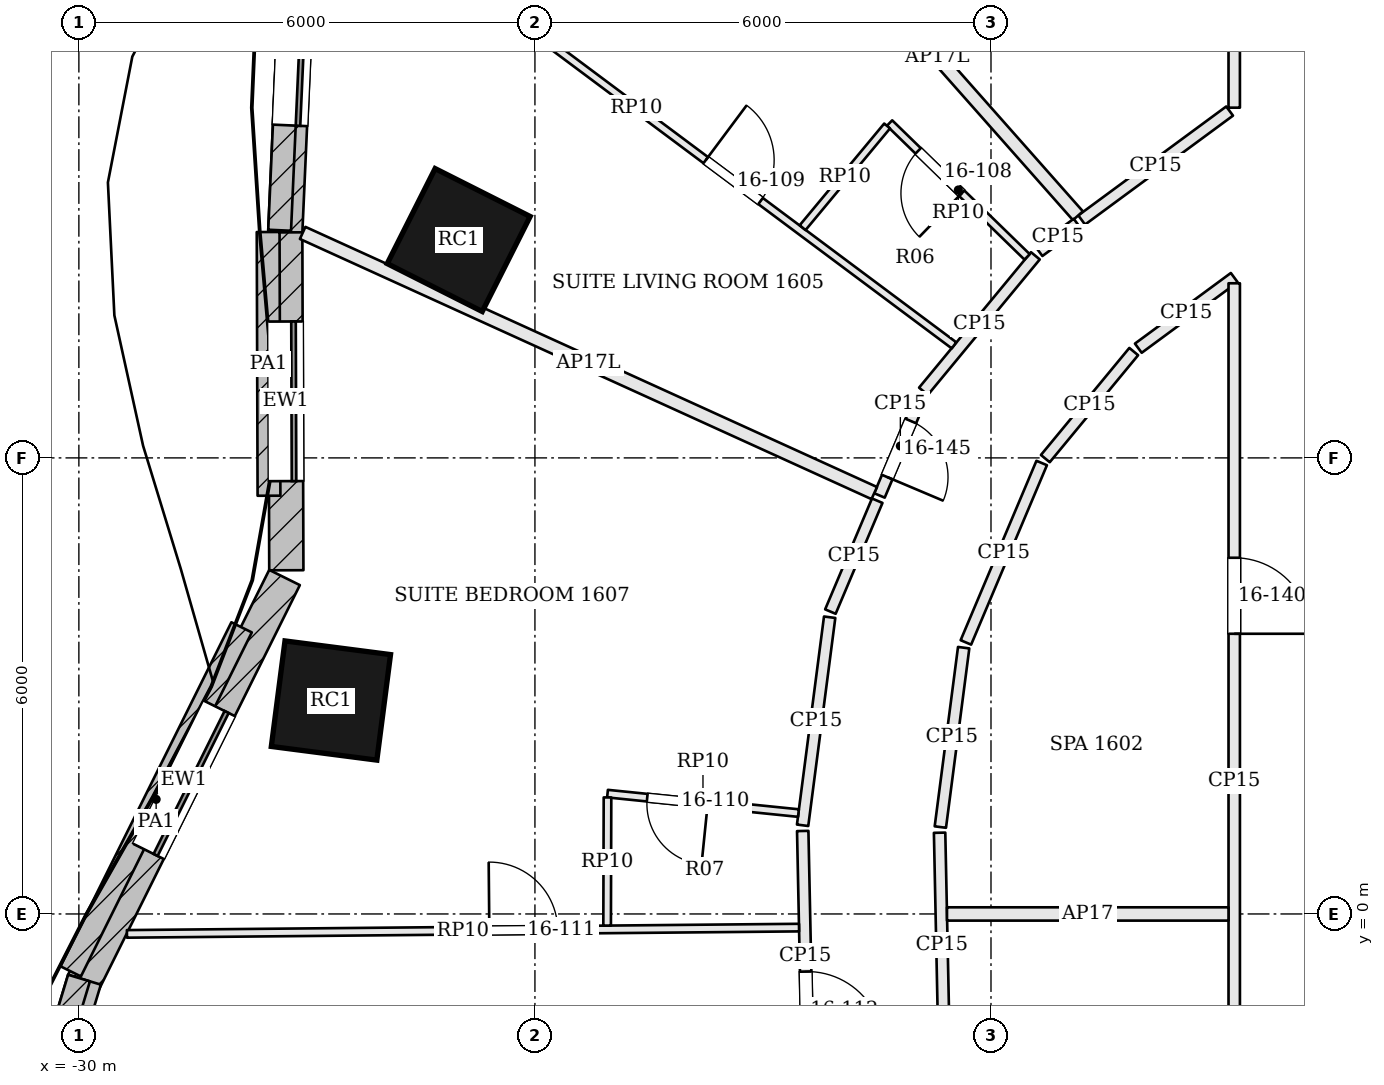
"""IFC4 building model, lengths in metres.
Left out: names, types, materials, properties, quantities, classifications, styles, units other than length and angle.
Written with IfcOpenShell. Run it as: python <this file> out.ifc"""

import sys

from ifc_helpers import new_model, si_unit, direction, frame, frame_2d, origin, origin_2d, place, context, subcontext, project, spatial, rectangle, extrude, element, fill, save


model = new_model("IFC4")
c1 = context("Model", 3, precision=1e-05, world=origin(), true_north=direction((0.0, 1.0)))
c2 = subcontext(c1, "Body", "Model", "MODEL_VIEW")
j1 = project(units=[si_unit("LENGTHUNIT", "METRE"), si_unit("PLANEANGLEUNIT", "RADIAN")], contexts=[c1])
p1 = place(None, origin())
s1 = spatial("IfcSite", under=j1, at=p1, CompositionType="ELEMENT")
p2 = place(p1, origin())
s2 = spatial("IfcBuilding", under=s1, at=p2, CompositionType="ELEMENT")
p3 = place(p2, frame((0.0, 0.0, 73.5)))
s3 = spatial("IfcBuildingStorey", under=s2, at=p3, CompositionType="ELEMENT", Elevation=73.5)
for number, where, z_axis, x_axis in (
    (1, (-25.003, 8.866, 0.0), (0.0, 0.0, 1.0), (-0.45, -0.893, 0.0)),
    (2, (-26.684, 2.808, 0.0), (0.0, 0.0, 1.0), (-0.128, -0.992, 0.0)),
):
    element("IfcColumn", number, at=place(p3, frame(where, z_axis=z_axis, x_axis=x_axis)), inside=s3, PredefinedType="COLUMN", context=c2, shape_type="SweptSolid", body=[
        extrude(rectangle(XDim=1.4, YDim=1.4, at=origin_2d()), origin(), (0.0, 0.0, 1.0), 2.8),
    ])
p4 = place(p3, frame((-27.065, 13.89, 0.0), z_axis=(0.0, 0.0, 1.0), x_axis=(-0.044544250924, -0.99900741224, 0.0)))
e3 = element("IfcWall", 3, at=p4, inside=s3, PredefinedType="SOLIDWALL", context=c2, shape_type="SweptSolid", body=[
    extrude(rectangle(XDim=4.938, YDim=0.45, at=frame_2d((2.469, 0.0))), origin(), (0.0, 0.0, 1.0), 3.3),
])
p5 = place(p4, frame((1.419, 0.0, 0.9)))
e4 = element("IfcOpeningElement", 4, at=p5, cuts=e3, PredefinedType="OPENING", context=c2, shape_type="SweptSolid", body=[
    extrude(rectangle(XDim=2.1, YDim=1.8, at=frame_2d((1.05, 0.9))), frame((0.0, 0.235, 0.0), z_axis=(0.0, -1.0, 0.0), x_axis=(1.0, 0.0, 0.0)), (0.0, 0.0, 1.0), 0.47),
])
p6 = place(p3, frame((-27.285, 8.967, 0.0), z_axis=(0.0, 0.0, 1.0), x_axis=(0.003185571797, -0.999994926053, 0.0)))
e5 = element("IfcWall", 5, at=p6, inside=s3, PredefinedType="SOLIDWALL", context=c2, shape_type="SweptSolid", body=[
    extrude(rectangle(XDim=4.445, YDim=0.45, at=frame_2d((2.223, 0.0))), origin(), (0.0, 0.0, 1.0), 3.3),
])
p7 = place(p6, frame((1.173, 0.0, 0.9)))
e6 = element("IfcOpeningElement", 6, at=p7, cuts=e5, PredefinedType="OPENING", context=c2, shape_type="SweptSolid", body=[
    extrude(rectangle(XDim=2.1, YDim=1.8, at=frame_2d((1.05, 0.9))), frame((0.0, 0.235, 0.0), z_axis=(0.0, -1.0, 0.0), x_axis=(1.0, 0.0, 0.0)), (0.0, 0.0, 1.0), 0.47),
])
p8 = place(p3, frame((-27.294, 4.427, 0.0), z_axis=(0.0, 0.0, 1.0), x_axis=(-0.444913249375, -0.895573671191, 0.0)))
e7 = element("IfcWall", 7, at=p8, inside=s3, PredefinedType="SOLIDWALL", context=c2, shape_type="SweptSolid", body=[
    extrude(rectangle(XDim=5.947, YDim=0.45, at=frame_2d((2.974, 0.0))), origin(), (0.0, 0.0, 1.0), 3.3),
])
p9 = place(p8, frame((1.924, 0.0, 0.9)))
e8 = element("IfcOpeningElement", 8, at=p9, cuts=e7, PredefinedType="OPENING", context=c2, shape_type="SweptSolid", body=[
    extrude(rectangle(XDim=2.1, YDim=1.8, at=frame_2d((1.05, 0.9))), frame((0.0, 0.235, 0.0), z_axis=(0.0, -1.0, 0.0), x_axis=(1.0, 0.0, 0.0)), (0.0, 0.0, 1.0), 0.47),
])
p10 = place(p3, frame((-29.927, -0.865, 0.0), z_axis=(0.0, 0.0, 1.0), x_axis=(-0.289432445378, -0.957198443147, 0.0)))
e9 = element("IfcWall", 9, at=p10, inside=s3, PredefinedType="SOLIDWALL", context=c2, shape_type="SweptSolid", body=[
    extrude(rectangle(XDim=4.361, YDim=0.45, at=frame_2d((2.181, 0.0))), origin(), (0.0, 0.0, 1.0), 3.3),
])
p11 = place(p10, frame((1.131, 0.0, 0.9)))
e10 = element("IfcOpeningElement", 10, at=p11, cuts=e9, PredefinedType="OPENING", context=c2, shape_type="SweptSolid", body=[
    extrude(rectangle(XDim=2.1, YDim=1.8, at=frame_2d((1.05, 0.9))), frame((0.0, 0.235, 0.0), z_axis=(0.0, -1.0, 0.0), x_axis=(1.0, 0.0, 0.0)), (0.0, 0.0, 1.0), 0.47),
])
p12 = place(p3, frame((-27.146, 13.757, 3.6), z_axis=(0.0, 0.0, 1.0), x_axis=(-0.044503972994, -0.999009207359, 0.0)))
e11 = element("IfcWall", 11, at=p12, inside=s3, PredefinedType="PARAPET", context=c2, shape_type="SweptSolid", body=[
    extrude(rectangle(XDim=4.767, YDim=0.3, at=frame_2d((2.384, 0.0))), origin(), (0.0, 0.0, 1.0), 1.1),
])
p13 = place(p3, frame((-27.51, 8.972, 3.6), z_axis=(0.0, 0.0, 1.0), x_axis=(0.003236912182, -0.999994761186, 0.0)))
e12 = element("IfcWall", 12, at=p13, inside=s3, PredefinedType="PARAPET", context=c2, shape_type="SweptSolid", body=[
    extrude(rectangle(XDim=3.469, YDim=0.3, at=frame_2d((1.735, 0.0))), origin(), (0.0, 0.0, 1.0), 1.1),
])
p14 = place(p3, frame((-27.859, 3.771, 3.6), z_axis=(0.0, 0.0, 1.0), x_axis=(-0.444912677503, -0.895573955292, 0.0)))
e13 = element("IfcWall", 13, at=p14, inside=s3, PredefinedType="PARAPET", context=c2, shape_type="SweptSolid", body=[
    extrude(rectangle(XDim=5.054, YDim=0.3, at=frame_2d((2.527, 0.0))), origin(), (0.0, 0.0, 1.0), 1.1),
])
p15 = place(p3, frame((-29.998, -0.843, 3.6), z_axis=(0.0, 0.0, 1.0), x_axis=(-0.289403108737, -0.95720731331, 0.0)))
e14 = element("IfcWall", 14, at=p15, inside=s3, PredefinedType="PARAPET", context=c2, shape_type="SweptSolid", body=[
    extrude(rectangle(XDim=4.205, YDim=0.3, at=frame_2d((2.103, 0.0))), origin(), (0.0, 0.0, 1.0), 1.1),
])
p16 = place(p3, frame((-14.8, 13.725, 0.0), z_axis=(0.0, 0.0, 1.0), x_axis=(0.0, -1.0, 0.0)))
e15 = element("IfcWall", 15, at=p16, inside=s3, PredefinedType="PARTITIONING", context=c2, shape_type="SweptSolid", body=[
    extrude(rectangle(XDim=3.118, YDim=0.15, at=frame_2d((1.559, 0.0))), origin(), (0.0, 0.0, 1.0), 2.684),
])
p17 = place(p3, frame((-14.861, 10.563, 0.0), z_axis=(0.0, 0.0, 1.0), x_axis=(-0.805253823387, -0.592930248781, 0.0)))
e16 = element("IfcWall", 16, at=p17, inside=s3, PredefinedType="PARTITIONING", context=c2, shape_type="SweptSolid", body=[
    extrude(rectangle(XDim=2.417, YDim=0.15, at=frame_2d((1.208, 0.0))), origin(), (0.0, 0.0, 1.0), 2.684),
])
p18 = place(p3, frame((-20.558, 13.368, 0.0), z_axis=(0.0, 0.0, 1.0), x_axis=(0.662734219401, -0.748854695141, 0.0)))
e17 = element("IfcWall", 17, at=p18, inside=s3, PredefinedType="PARTITIONING", context=c2, shape_type="SweptSolid", body=[
    extrude(rectangle(XDim=5.585, YDim=0.175, at=frame_2d((2.792, 0.0))), origin(), (0.0, 0.0, 1.0), 2.28),
])
p19 = place(p3, frame((-16.867, 9.085, 0.0), z_axis=(0.0, 0.0, 1.0), x_axis=(-0.805381102541, -0.592757353113, 0.0)))
e18 = element("IfcWall", 18, at=p19, inside=s3, PredefinedType="PARTITIONING", context=c2, shape_type="SweptSolid", body=[
    extrude(rectangle(XDim=0.622, YDim=0.15, at=frame_2d((0.311, 0.0))), origin(), (0.0, 0.0, 1.0), 2.684),
])
p20 = place(p3, frame((-17.416, 8.659, 0.0), z_axis=(0.0, 0.0, 1.0), x_axis=(-0.636865073139, -0.770975277564, 0.0)))
e19 = element("IfcWall", 19, at=p20, inside=s3, PredefinedType="PARTITIONING", context=c2, shape_type="SweptSolid", body=[
    extrude(rectangle(XDim=2.312, YDim=0.15, at=frame_2d((1.156, 0.0))), origin(), (0.0, 0.0, 1.0), 2.684),
])
p21 = place(p3, frame((-18.918, 6.807, 0.0), z_axis=(0.0, 0.0, 1.0), x_axis=(-0.389115481404, -0.921188982854, 0.0)))
e20 = element("IfcWall", 20, at=p21, inside=s3, PredefinedType="PARTITIONING", context=c2, shape_type="SweptSolid", body=[
    extrude(rectangle(XDim=1.412, YDim=0.15, at=frame_2d((0.706, 0.0))), origin(), (0.0, 0.0, 1.0), 2.684),
])
p22 = place(p21, frame((0.35, 0.0, 0.0)))
e21 = element("IfcOpeningElement", 21, at=p22, cuts=e20, PredefinedType="OPENING", context=c2, shape_type="SweptSolid", body=[
    extrude(rectangle(XDim=0.8, YDim=2.1, at=frame_2d((0.4, 1.05))), frame((0.0, 0.085, 0.0), z_axis=(0.0, -1.0, 0.0), x_axis=(1.0, 0.0, 0.0)), (0.0, 0.0, 1.0), 0.17),
])
p23 = place(p3, frame((-27.056, 8.96, 0.0), z_axis=(0.0, 0.0, 1.0), x_axis=(0.910158921773, -0.414259263164, 0.0)))
e22 = element("IfcWall", 22, at=p23, inside=s3, PredefinedType="PARTITIONING", context=c2, shape_type="SweptSolid", body=[
    extrude(rectangle(XDim=8.263, YDim=0.175, at=frame_2d((4.131, 0.0))), origin(), (0.0, 0.0, 1.0), 2.28),
])
p24 = place(p3, frame((-19.497, 5.437, 0.0), z_axis=(0.0, 0.0, 1.0), x_axis=(-0.389131954688, -0.921182024271, 0.0)))
e23 = element("IfcWall", 23, at=p24, inside=s3, PredefinedType="PARTITIONING", context=c2, shape_type="SweptSolid", body=[
    extrude(rectangle(XDim=1.583, YDim=0.15, at=frame_2d((0.792, 0.0))), origin(), (0.0, 0.0, 1.0), 2.684),
])
p25 = place(p3, frame((-20.123, 3.904, 0.0), z_axis=(0.0, 0.0, 1.0), x_axis=(-0.128964810526, -0.991649170648, 0.0)))
e24 = element("IfcWall", 24, at=p25, inside=s3, PredefinedType="PARTITIONING", context=c2, shape_type="SweptSolid", body=[
    extrude(rectangle(XDim=2.76, YDim=0.15, at=frame_2d((1.38, 0.0))), origin(), (0.0, 0.0, 1.0), 2.684),
])
p26 = place(p3, frame((-20.477, 1.092, 0.0), z_axis=(0.0, 0.0, 1.0), x_axis=(0.020774736247, -0.999784181878, 0.0)))
e25 = element("IfcWall", 25, at=p26, inside=s3, PredefinedType="PARTITIONING", context=c2, shape_type="SweptSolid", body=[
    extrude(rectangle(XDim=3.291, YDim=0.15, at=frame_2d((1.645, 0.0))), origin(), (0.0, 0.0, 1.0), 2.684),
])
p27 = place(p26, frame((1.85, 0.0, 0.0)))
e26 = element("IfcOpeningElement", 26, at=p27, cuts=e25, PredefinedType="OPENING", context=c2, shape_type="SweptSolid", body=[
    extrude(rectangle(XDim=1.0, YDim=2.1, at=frame_2d((0.5, 1.05))), frame((0.0, 0.085, 0.0), z_axis=(0.0, -1.0, 0.0), x_axis=(1.0, 0.0, 0.0)), (0.0, 0.0, 1.0), 0.17),
])
p28 = place(p3, frame((-18.615, -1.89, 0.0), z_axis=(0.0, 0.0, 1.0), x_axis=(-0.020789300895, 0.99978387913, 0.0)))
e27 = element("IfcWall", 27, at=p28, inside=s3, PredefinedType="PARTITIONING", context=c2, shape_type="SweptSolid", body=[
    extrude(rectangle(XDim=2.959, YDim=0.15, at=frame_2d((1.48, 0.0))), origin(), (0.0, 0.0, 1.0), 2.684),
])
p29 = place(p3, frame((-18.667, 1.143, 0.0), z_axis=(0.0, 0.0, 1.0), x_axis=(0.128944484332, 0.991651813874, 0.0)))
e28 = element("IfcWall", 28, at=p29, inside=s3, PredefinedType="PARTITIONING", context=c2, shape_type="SweptSolid", body=[
    extrude(rectangle(XDim=2.38, YDim=0.15, at=frame_2d((1.19, 0.0))), origin(), (0.0, 0.0, 1.0), 2.684),
])
p30 = place(p3, frame((-18.33, 3.573, 0.0), z_axis=(0.0, 0.0, 1.0), x_axis=(0.389176861346, 0.921163053207, 0.0)))
e29 = element("IfcWall", 29, at=p30, inside=s3, PredefinedType="PARTITIONING", context=c2, shape_type="SweptSolid", body=[
    extrude(rectangle(XDim=2.563, YDim=0.15, at=frame_2d((1.281, 0.0))), origin(), (0.0, 0.0, 1.0), 2.684),
])
p31 = place(p3, frame((-17.285, 5.991, 0.0), z_axis=(0.0, 0.0, 1.0), x_axis=(0.636877992195, 0.770964605581, 0.0)))
e30 = element("IfcWall", 30, at=p31, inside=s3, PredefinedType="PARTITIONING", context=c2, shape_type="SweptSolid", body=[
    extrude(rectangle(XDim=1.826, YDim=0.15, at=frame_2d((0.913, 0.0))), origin(), (0.0, 0.0, 1.0), 2.684),
])
p32 = place(p3, frame((-16.062, 7.443, 0.0), z_axis=(0.0, 0.0, 1.0), x_axis=(0.805204624788, 0.5929970592, 0.0)))
e31 = element("IfcWall", 31, at=p32, inside=s3, PredefinedType="PARTITIONING", context=c2, shape_type="SweptSolid", body=[
    extrude(rectangle(XDim=1.567, YDim=0.15, at=frame_2d((0.783, 0.0))), origin(), (0.0, 0.0, 1.0), 2.684),
])
p33 = place(p3, frame((-14.8, 8.297, 0.0), z_axis=(0.0, 0.0, 1.0), x_axis=(0.0, -1.0, 0.0)))
e32 = element("IfcWall", 32, at=p33, inside=s3, PredefinedType="PARTITIONING", context=c2, shape_type="SweptSolid", body=[
    extrude(rectangle(XDim=13.097, YDim=0.15, at=frame_2d((6.549, 0.0))), origin(), (0.0, 0.0, 1.0), 2.684),
])
p34 = place(p33, frame((3.611, 0.0, 0.0)))
e33 = element("IfcOpeningElement", 33, at=p34, cuts=e32, PredefinedType="OPENING", context=c2, shape_type="SweptSolid", body=[
    extrude(rectangle(XDim=1.0, YDim=2.1, at=frame_2d((0.5, 1.05))), frame((0.0, 0.085, 0.0), z_axis=(0.0, -1.0, 0.0), x_axis=(1.0, 0.0, 0.0)), (0.0, 0.0, 1.0), 0.17),
])
p35 = place(p3, frame((-26.844, 13.716, 0.0), z_axis=(0.0, 0.0, 1.0), x_axis=(0.801523054034, -0.597963873367, 0.0)))
e34 = element("IfcWall", 34, at=p35, inside=s3, PredefinedType="PARTITIONING", context=c2, shape_type="SweptSolid", body=[
    extrude(rectangle(XDim=10.427, YDim=0.1, at=frame_2d((5.214, 0.0))), origin(), (0.0, 0.0, 1.0), 2.784),
])
p36 = place(p35, frame((6.352, 0.0, 0.0)))
e35 = element("IfcOpeningElement", 35, at=p36, cuts=e34, PredefinedType="OPENING", context=c2, shape_type="SweptSolid", body=[
    extrude(rectangle(XDim=0.9, YDim=2.4, at=frame_2d((0.45, 1.2))), frame((0.0, 0.06, 0.0), z_axis=(0.0, -1.0, 0.0), x_axis=(1.0, 0.0, 0.0)), (0.0, 0.0, 1.0), 0.12),
])
p37 = place(p3, frame((-17.525, 8.644, 0.0), z_axis=(0.0, 0.0, 1.0), x_axis=(-0.716661927844, 0.697420734692, 0.0)))
e36 = element("IfcWall", 36, at=p37, inside=s3, PredefinedType="PARTITIONING", context=c2, shape_type="SweptSolid", body=[
    extrude(rectangle(XDim=2.525, YDim=0.1, at=frame_2d((1.262, 0.0))), origin(), (0.0, 0.0, 1.0), 2.784),
])
p38 = place(p37, frame((1.2, 0.0, 0.0)))
e37 = element("IfcOpeningElement", 37, at=p38, cuts=e36, PredefinedType="OPENING", context=c2, shape_type="SweptSolid", body=[
    extrude(rectangle(XDim=0.8, YDim=2.1, at=frame_2d((0.4, 1.05))), frame((0.0, 0.06, 0.0), z_axis=(0.0, -1.0, 0.0), x_axis=(1.0, 0.0, 0.0)), (0.0, 0.0, 1.0), 0.12),
])
p39 = place(p3, frame((-19.366, 10.367, 0.0), z_axis=(0.0, 0.0, 1.0), x_axis=(-0.63913466048, -0.76909484836, 0.0)))
e38 = element("IfcWall", 38, at=p39, inside=s3, PredefinedType="PARTITIONING", context=c2, shape_type="SweptSolid", body=[
    extrude(rectangle(XDim=1.74, YDim=0.1, at=frame_2d((0.87, 0.0))), origin(), (0.0, 0.0, 1.0), 2.784),
])
p40 = place(p3, frame((-29.368, -0.262, 0.0), z_axis=(0.0, 0.0, 1.0), x_axis=(0.999956200621, 0.009359318369, 0.0)))
e39 = element("IfcWall", 39, at=p40, inside=s3, PredefinedType="PARTITIONING", context=c2, shape_type="SweptSolid", body=[
    extrude(rectangle(XDim=8.843, YDim=0.1, at=frame_2d((4.421, 0.0))), origin(), (0.0, 0.0, 1.0), 2.784),
])
p41 = place(p40, frame((4.768, 0.0, 0.0)))
e40 = element("IfcOpeningElement", 40, at=p41, cuts=e39, PredefinedType="OPENING", context=c2, shape_type="SweptSolid", body=[
    extrude(rectangle(XDim=0.9, YDim=2.4, at=frame_2d((0.45, 1.2))), frame((0.0, 0.06, 0.0), z_axis=(0.0, -1.0, 0.0), x_axis=(1.0, 0.0, 0.0)), (0.0, 0.0, 1.0), 0.12),
])
p42 = place(p3, frame((-20.533, 1.327, 0.0), z_axis=(0.0, 0.0, 1.0), x_axis=(-0.994862401986, 0.101236362609, 0.0)))
e41 = element("IfcWall", 41, at=p42, inside=s3, PredefinedType="PARTITIONING", context=c2, shape_type="SweptSolid", body=[
    extrude(rectangle(XDim=2.525, YDim=0.1, at=frame_2d((1.262, 0.0))), origin(), (0.0, 0.0, 1.0), 2.784),
])
p43 = place(p42, frame((1.2, 0.0, 0.0)))
e42 = element("IfcOpeningElement", 42, at=p43, cuts=e41, PredefinedType="OPENING", context=c2, shape_type="SweptSolid", body=[
    extrude(rectangle(XDim=0.8, YDim=2.1, at=frame_2d((0.4, 1.05))), frame((0.0, 0.06, 0.0), z_axis=(0.0, -1.0, 0.0), x_axis=(1.0, 0.0, 0.0)), (0.0, 0.0, 1.0), 0.12),
])
p44 = place(p3, frame((-23.045, 1.533, 0.0), z_axis=(0.0, 0.0, 1.0), x_axis=(-0.002895601007, -0.999995807739, 0.0)))
e43 = element("IfcWall", 43, at=p44, inside=s3, PredefinedType="PARTITIONING", context=c2, shape_type="SweptSolid", body=[
    extrude(rectangle(XDim=1.686, YDim=0.1, at=frame_2d((0.843, 0.0))), origin(), (0.0, 0.0, 1.0), 2.784),
])
p45 = place(p3, frame((-18.579, 0.0, 0.0), z_axis=(0.0, 0.0, 1.0), x_axis=(1.0, 0.0, 0.0)))
e44 = element("IfcWall", 44, at=p45, inside=s3, PredefinedType="PARTITIONING", context=c2, shape_type="SweptSolid", body=[
    extrude(rectangle(XDim=3.704, YDim=0.175, at=frame_2d((1.852, 0.0))), origin(), (0.0, 0.0, 1.0), 2.798),
])
p46 = place(p5, origin())
e45 = element("IfcWindow", 45, at=p46, inside=s3, PartitioningType="SINGLE_PANEL", PredefinedType="WINDOW", context=c2, shape_type="SweptSolid", body=[
    extrude(rectangle(XDim=2.1, YDim=1.8, at=frame_2d((1.05, 0.9))), frame((0.0, 0.135, 0.0), z_axis=(0.0, -1.0, 0.0), x_axis=(1.0, 0.0, 0.0)), (0.0, 0.0, 1.0), 0.06),
])
fill(e4, e45)
p47 = place(p7, origin())
e46 = element("IfcWindow", 46, at=p47, inside=s3, PartitioningType="SINGLE_PANEL", PredefinedType="WINDOW", context=c2, shape_type="SweptSolid", body=[
    extrude(rectangle(XDim=2.1, YDim=1.8, at=frame_2d((1.05, 0.9))), frame((0.0, 0.135, 0.0), z_axis=(0.0, -1.0, 0.0), x_axis=(1.0, 0.0, 0.0)), (0.0, 0.0, 1.0), 0.06),
])
fill(e6, e46)
p48 = place(p9, origin())
e47 = element("IfcWindow", 47, at=p48, inside=s3, PartitioningType="SINGLE_PANEL", PredefinedType="WINDOW", context=c2, shape_type="SweptSolid", body=[
    extrude(rectangle(XDim=2.1, YDim=1.8, at=frame_2d((1.05, 0.9))), frame((0.0, 0.135, 0.0), z_axis=(0.0, -1.0, 0.0), x_axis=(1.0, 0.0, 0.0)), (0.0, 0.0, 1.0), 0.06),
])
fill(e8, e47)
p49 = place(p38, origin())
e48 = element("IfcDoor", 48, at=p49, inside=s3, OperationType="SINGLE_SWING_LEFT", PredefinedType="DOOR", context=c2, shape_type="SweptSolid", body=[
    extrude(rectangle(XDim=0.8, YDim=2.1, at=frame_2d((0.4, 1.05))), frame((0.0, 0.025, 0.0), z_axis=(0.0, -1.0, 0.0), x_axis=(1.0, 0.0, 0.0)), (0.0, 0.0, 1.0), 0.05),
])
fill(e37, e48)
p50 = place(p36, origin())
e49 = element("IfcDoor", 49, at=p50, inside=s3, OperationType="SINGLE_SWING_LEFT", PredefinedType="DOOR", context=c2, shape_type="SweptSolid", body=[
    extrude(rectangle(XDim=0.9, YDim=2.4, at=frame_2d((0.45, 1.2))), frame((0.0, 0.025, 0.0), z_axis=(0.0, -1.0, 0.0), x_axis=(1.0, 0.0, 0.0)), (0.0, 0.0, 1.0), 0.05),
])
fill(e35, e49)
p51 = place(p43, origin())
e50 = element("IfcDoor", 50, at=p51, inside=s3, OperationType="SINGLE_SWING_LEFT", PredefinedType="DOOR", context=c2, shape_type="SweptSolid", body=[
    extrude(rectangle(XDim=0.8, YDim=2.1, at=frame_2d((0.4, 1.05))), frame((0.0, 0.025, 0.0), z_axis=(0.0, -1.0, 0.0), x_axis=(1.0, 0.0, 0.0)), (0.0, 0.0, 1.0), 0.05),
])
fill(e42, e50)
p52 = place(p41, origin())
e51 = element("IfcDoor", 51, at=p52, inside=s3, OperationType="SINGLE_SWING_LEFT", PredefinedType="DOOR", context=c2, shape_type="SweptSolid", body=[
    extrude(rectangle(XDim=0.9, YDim=2.4, at=frame_2d((0.45, 1.2))), frame((0.0, 0.025, 0.0), z_axis=(0.0, -1.0, 0.0), x_axis=(1.0, 0.0, 0.0)), (0.0, 0.0, 1.0), 0.05),
])
fill(e40, e51)
p53 = place(p27, origin())
e52 = element("IfcDoor", 52, at=p53, inside=s3, OperationType="SINGLE_SWING_RIGHT", PredefinedType="DOOR", context=c2, shape_type="SweptSolid", body=[
    extrude(rectangle(XDim=1.0, YDim=2.1, at=frame_2d((0.5, 1.05))), frame((0.0, 0.025, 0.0), z_axis=(0.0, -1.0, 0.0), x_axis=(1.0, 0.0, 0.0)), (0.0, 0.0, 1.0), 0.05),
])
fill(e26, e52)
p54 = place(p34, origin())
e53 = element("IfcDoor", 53, at=p54, inside=s3, OperationType="SINGLE_SWING_RIGHT", PredefinedType="DOOR", context=c2, shape_type="SweptSolid", body=[
    extrude(rectangle(XDim=1.0, YDim=2.1, at=frame_2d((0.5, 1.05))), frame((0.0, 0.025, 0.0), z_axis=(0.0, -1.0, 0.0), x_axis=(1.0, 0.0, 0.0)), (0.0, 0.0, 1.0), 0.05),
])
fill(e33, e53)
p55 = place(p22, origin())
e54 = element("IfcDoor", 54, at=p55, inside=s3, OperationType="SINGLE_SWING_RIGHT", PredefinedType="DOOR", context=c2, shape_type="SweptSolid", body=[
    extrude(rectangle(XDim=0.8, YDim=2.1, at=frame_2d((0.4, 1.05))), frame((0.0, 0.025, 0.0), z_axis=(0.0, -1.0, 0.0), x_axis=(1.0, 0.0, 0.0)), (0.0, 0.0, 1.0), 0.05),
])
fill(e21, e54)
save(model, sys.argv[1])
